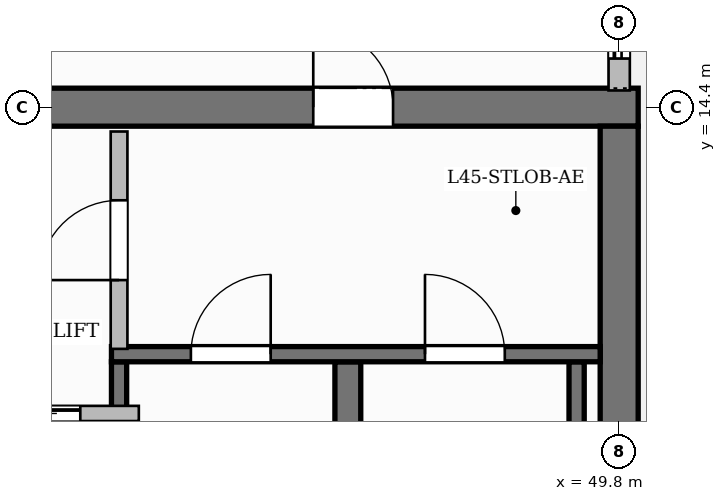
"""IFC4 building model, lengths in metres.
Left out: names, types, materials, properties, quantities, classifications, styles, units other than length and angle.
Written with IfcOpenShell. Run it as: python <this file> out.ifc"""

import sys

from ifc_helpers import new_model, si_unit, direction, frame, frame_2d, origin, place, context, subcontext, project, spatial, rectangle, extrude, source, transform, mapped, element, fill, save


model = new_model("IFC4")
c1 = context("Model", 3, precision=1e-05, world=origin(), true_north=direction((0.0, 1.0)))
c2 = subcontext(c1, "Body", "Model", "MODEL_VIEW")
j1 = project(units=[si_unit("LENGTHUNIT", "METRE"), si_unit("PLANEANGLEUNIT", "RADIAN")], contexts=[c1])
p1 = place(None, origin())
s1 = spatial("IfcSite", under=j1, at=p1, CompositionType="ELEMENT")
p2 = place(p1, origin())
s2 = spatial("IfcBuilding", under=s1, at=p2, CompositionType="ELEMENT")
p3 = place(p2, frame((0.0, 0.0, 181.1)))
s3 = spatial("IfcBuildingStorey", under=s2, at=p3, CompositionType="ELEMENT", Elevation=181.1)
p4 = place(p3, frame((34.55, 14.4, 0.0), z_axis=(0.0, 0.0, 1.0), x_axis=(1.0, 0.0, 0.0)))
e1 = element("IfcWall", 1, at=p4, inside=s3, PredefinedType="SHEAR", context=c2, shape_type="SweptSolid", body=[
    extrude(rectangle(XDim=15.5, YDim=0.5, at=frame_2d((7.75, 0.0))), origin(), (0.0, 0.0, 1.0), 3.85),
])
p5 = place(p4, frame((5.38, 0.0, 0.0)))
e2 = element("IfcOpeningElement", 2, at=p5, cuts=e1, PredefinedType="OPENING", context=c2, shape_type="SweptSolid", body=[
    extrude(rectangle(XDim=1.5, YDim=2.2, at=frame_2d((0.75, 1.1))), frame((0.0, 0.26, 0.0), z_axis=(0.0, -1.0, 0.0), x_axis=(1.0, 0.0, 0.0)), (0.0, 0.0, 1.0), 0.52),
])
p6 = place(p4, frame((1.595, 0.0, 0.0)))
e3 = element("IfcOpeningElement", 3, at=p6, cuts=e1, PredefinedType="OPENING", context=c2, shape_type="SweptSolid", body=[
    extrude(rectangle(XDim=1.05, YDim=2.15, at=frame_2d((0.525, 1.075))), frame((0.0, 0.26, 0.0), z_axis=(0.0, -1.0, 0.0), x_axis=(1.0, 0.0, 0.0)), (0.0, 0.0, 1.0), 0.52),
])
p7 = place(p4, frame((11.225, 0.0, 0.0)))
e4 = element("IfcOpeningElement", 4, at=p7, cuts=e1, PredefinedType="OPENING", context=c2, shape_type="SweptSolid", body=[
    extrude(rectangle(XDim=1.05, YDim=2.15, at=frame_2d((0.525, 1.075))), frame((0.0, 0.26, 0.0), z_axis=(0.0, -1.0, 0.0), x_axis=(1.0, 0.0, 0.0)), (0.0, 0.0, 1.0), 0.52),
])
p8 = place(p3, frame((49.8, 3.85, 0.0), z_axis=(0.0, 0.0, 1.0), x_axis=(0.0, 1.0, 0.0)))
e5 = element("IfcWall", 5, at=p8, inside=s3, PredefinedType="SHEAR", context=c2, shape_type="SweptSolid", body=[
    extrude(rectangle(XDim=10.3, YDim=0.5, at=frame_2d((5.15, 0.0))), origin(), (0.0, 0.0, 1.0), 3.85),
])
p9 = place(p3, frame((43.22, 4.1, 0.0), z_axis=(0.0, 0.0, 1.0), x_axis=(0.0, 1.0, 0.0)))
e6 = element("IfcWall", 6, at=p9, inside=s3, PredefinedType="SHEAR", context=c2, shape_type="SweptSolid", body=[
    extrude(rectangle(XDim=6.95, YDim=0.2, at=frame_2d((3.475, 0.0))), origin(), (0.0, 0.0, 1.0), 3.85),
])
p10 = place(p3, frame((46.23, 4.1, 0.0), z_axis=(0.0, 0.0, 1.0), x_axis=(0.0, 1.0, 0.0)))
e7 = element("IfcWall", 7, at=p10, inside=s3, PredefinedType="SHEAR", context=c2, shape_type="SweptSolid", body=[
    extrude(rectangle(XDim=6.95, YDim=0.34, at=frame_2d((3.475, 0.0))), origin(), (0.0, 0.0, 1.0), 3.85),
])
p11 = place(p3, frame((49.24, 4.1, 0.0), z_axis=(0.0, 0.0, 1.0), x_axis=(0.0, 1.0, 0.0)))
e8 = element("IfcWall", 8, at=p11, inside=s3, PredefinedType="SHEAR", context=c2, shape_type="SweptSolid", body=[
    extrude(rectangle(XDim=6.95, YDim=0.2, at=frame_2d((3.475, 0.0))), origin(), (0.0, 0.0, 1.0), 3.85),
])
p12 = place(p3, frame((43.12, 11.15, 0.0), z_axis=(0.0, 0.0, 1.0), x_axis=(1.0, 0.0, 0.0)))
e9 = element("IfcWall", 9, at=p12, inside=s3, PredefinedType="SHEAR", context=c2, shape_type="SweptSolid", body=[
    extrude(rectangle(XDim=6.43, YDim=0.2, at=frame_2d((3.215, 0.0))), origin(), (0.0, 0.0, 1.0), 3.85),
])
p13 = place(p12, frame((1.045, 0.0, 0.0)))
e10 = element("IfcOpeningElement", 10, at=p13, cuts=e9, PredefinedType="OPENING", context=c2, shape_type="SweptSolid", body=[
    extrude(rectangle(XDim=1.05, YDim=2.2, at=frame_2d((0.525, 1.1))), frame((0.0, 0.11, 0.0), z_axis=(0.0, -1.0, 0.0), x_axis=(1.0, 0.0, 0.0)), (0.0, 0.0, 1.0), 0.22),
])
p14 = place(p12, frame((4.125, 0.0, 0.0)))
e11 = element("IfcOpeningElement", 11, at=p14, cuts=e9, PredefinedType="OPENING", context=c2, shape_type="SweptSolid", body=[
    extrude(rectangle(XDim=1.05, YDim=2.2, at=frame_2d((0.525, 1.1))), frame((0.0, 0.11, 0.0), z_axis=(0.0, -1.0, 0.0), x_axis=(1.0, 0.0, 0.0)), (0.0, 0.0, 1.0), 0.22),
])
p15 = place(p3, frame((43.22, 11.22, 0.0), z_axis=(0.0, 0.0, 1.0), x_axis=(0.0, 1.0, 0.0)))
e12 = element("IfcWall", 12, at=p15, inside=s3, PredefinedType="PARTITIONING", context=c2, shape_type="SweptSolid", body=[
    extrude(rectangle(XDim=2.86, YDim=0.22, at=frame_2d((1.43, 0.0))), origin(), (0.0, 0.0, 1.0), 3.6),
])
p16 = place(p15, frame((0.905, 0.0, 0.0)))
e13 = element("IfcOpeningElement", 13, at=p16, cuts=e12, PredefinedType="OPENING", context=c2, shape_type="SweptSolid", body=[
    extrude(rectangle(XDim=1.05, YDim=2.15, at=frame_2d((0.525, 1.075))), frame((0.0, 0.12, 0.0), z_axis=(0.0, -1.0, 0.0), x_axis=(1.0, 0.0, 0.0)), (0.0, 0.0, 1.0), 0.24),
])
p17 = place(p3, frame((40.84, 10.37, 0.0), z_axis=(0.0, 0.0, 1.0), x_axis=(1.0, 0.0, 0.0)))
e14 = element("IfcWall", 14, at=p17, inside=s3, PredefinedType="PARTITIONING", context=c2, shape_type="SweptSolid", body=[
    extrude(rectangle(XDim=2.64, YDim=0.2, at=frame_2d((1.32, 0.0))), origin(), (0.0, 0.0, 1.0), 3.6),
])
p18 = place(p17, frame((0.77, 0.0, 0.0)))
e15 = element("IfcOpeningElement", 15, at=p18, cuts=e14, PredefinedType="OPENING", context=c2, shape_type="SweptSolid", body=[
    extrude(rectangle(XDim=1.1, YDim=2.2, at=frame_2d((0.55, 1.1))), frame((0.0, 0.11, 0.0), z_axis=(0.0, -1.0, 0.0), x_axis=(1.0, 0.0, 0.0)), (0.0, 0.0, 1.0), 0.22),
])
p19 = place(p3, frame((49.8, 14.62, 0.0), z_axis=(0.0, 0.0, 1.0), x_axis=(0.0, 1.0, 0.0)))
e16 = element("IfcWall", 16, at=p19, inside=s3, PredefinedType="SOLIDWALL", context=c2, shape_type="SweptSolid", body=[
    extrude(rectangle(XDim=6.93, YDim=0.28, at=frame_2d((3.465, 0.0))), origin(), (0.0, 0.0, 1.0), 3.085),
])
p20 = place(p19, frame((0.42, 0.0, 0.0)))
e17 = element("IfcOpeningElement", 17, at=p20, cuts=e16, PredefinedType="OPENING", context=c2, shape_type="SweptSolid", body=[
    extrude(rectangle(XDim=1.2, YDim=2.2, at=frame_2d((0.6, 1.1))), frame((0.0, 0.15, 0.0), z_axis=(0.0, -1.0, 0.0), x_axis=(1.0, 0.0, 0.0)), (0.0, 0.0, 1.0), 0.3),
])
p21 = place(p19, frame((3.384, 0.0, 0.8)))
e18 = element("IfcOpeningElement", 18, at=p21, cuts=e16, PredefinedType="OPENING", context=c2, shape_type="SweptSolid", body=[
    extrude(rectangle(XDim=1.8, YDim=1.85, at=frame_2d((0.9, 0.925))), frame((0.0, 0.15, 0.0), z_axis=(0.0, -1.0, 0.0), x_axis=(1.0, 0.0, 0.0)), (0.0, 0.0, 1.0), 0.3),
])
m1 = source(origin(), c2, "Body", "SweptSolid", [
    extrude(rectangle(XDim=1.05, YDim=2.2, at=frame_2d((0.525, 1.1))), frame((0.0, 0.025, 0.0), z_axis=(0.0, -1.0, 0.0), x_axis=(1.0, 0.0, 0.0)), (0.0, 0.0, 1.0), 0.05),
])
p22 = place(p13, origin())
e19 = element("IfcDoor", 19, at=p22, inside=s3, OperationType="SINGLE_SWING_RIGHT", PredefinedType="DOOR", context=c2, shape_type="MappedRepresentation", body=[
    mapped(m1, transform((0.0, 0.0, 0.0), scale=1.0)),
])
fill(e10, e19)
p23 = place(p14, origin())
e20 = element("IfcDoor", 20, at=p23, inside=s3, OperationType="SINGLE_SWING_LEFT", PredefinedType="DOOR", context=c2, shape_type="MappedRepresentation", body=[
    mapped(m1, transform((0.0, 0.0, 0.0), scale=1.0)),
])
fill(e11, e20)
m2 = source(origin(), c2, "Body", "SweptSolid", [
    extrude(rectangle(XDim=1.05, YDim=2.15, at=frame_2d((0.525, 1.075))), frame((0.0, 0.025, 0.0), z_axis=(0.0, -1.0, 0.0), x_axis=(1.0, 0.0, 0.0)), (0.0, 0.0, 1.0), 0.05),
])
p24 = place(p16, origin())
e21 = element("IfcDoor", 21, at=p24, inside=s3, OperationType="SINGLE_SWING_LEFT", PredefinedType="DOOR", context=c2, shape_type="MappedRepresentation", body=[
    mapped(m2, transform((0.0, 0.0, 0.0), scale=1.0)),
])
fill(e13, e21)
p25 = place(p7, origin())
e22 = element("IfcDoor", 22, at=p25, inside=s3, OperationType="SINGLE_SWING_LEFT", PredefinedType="DOOR", context=c2, shape_type="MappedRepresentation", body=[
    mapped(m2, transform((0.0, 0.0, 0.0), scale=1.0)),
])
fill(e4, e22)
m3 = source(origin(), c2, "Body", "SweptSolid", [
    extrude(rectangle(XDim=1.1, YDim=2.2, at=frame_2d((0.55, 1.1))), frame((0.0, 0.025, 0.0), z_axis=(0.0, -1.0, 0.0), x_axis=(1.0, 0.0, 0.0)), (0.0, 0.0, 1.0), 0.05),
])
p26 = place(p18, origin())
e23 = element("IfcDoor", 23, at=p26, inside=s3, OperationType="SLIDING_TO_LEFT", PredefinedType="DOOR", context=c2, shape_type="MappedRepresentation", body=[
    mapped(m3, transform((0.0, 0.0, 0.0), scale=1.0)),
])
fill(e15, e23)
m4 = source(origin(), c2, "Body", "SweptSolid", [
    extrude(rectangle(XDim=1.2, YDim=2.2, at=frame_2d((0.6, 1.1))), frame((0.0, 0.025, 0.0), z_axis=(0.0, -1.0, 0.0), x_axis=(1.0, 0.0, 0.0)), (0.0, 0.0, 1.0), 0.05),
])
p27 = place(p20, origin())
e24 = element("IfcDoor", 24, at=p27, inside=s3, OperationType="SLIDING_TO_LEFT", PredefinedType="DOOR", context=c2, shape_type="MappedRepresentation", body=[
    mapped(m4, transform((0.0, 0.0, 0.0), scale=1.0)),
])
fill(e17, e24)
save(model, sys.argv[1])
